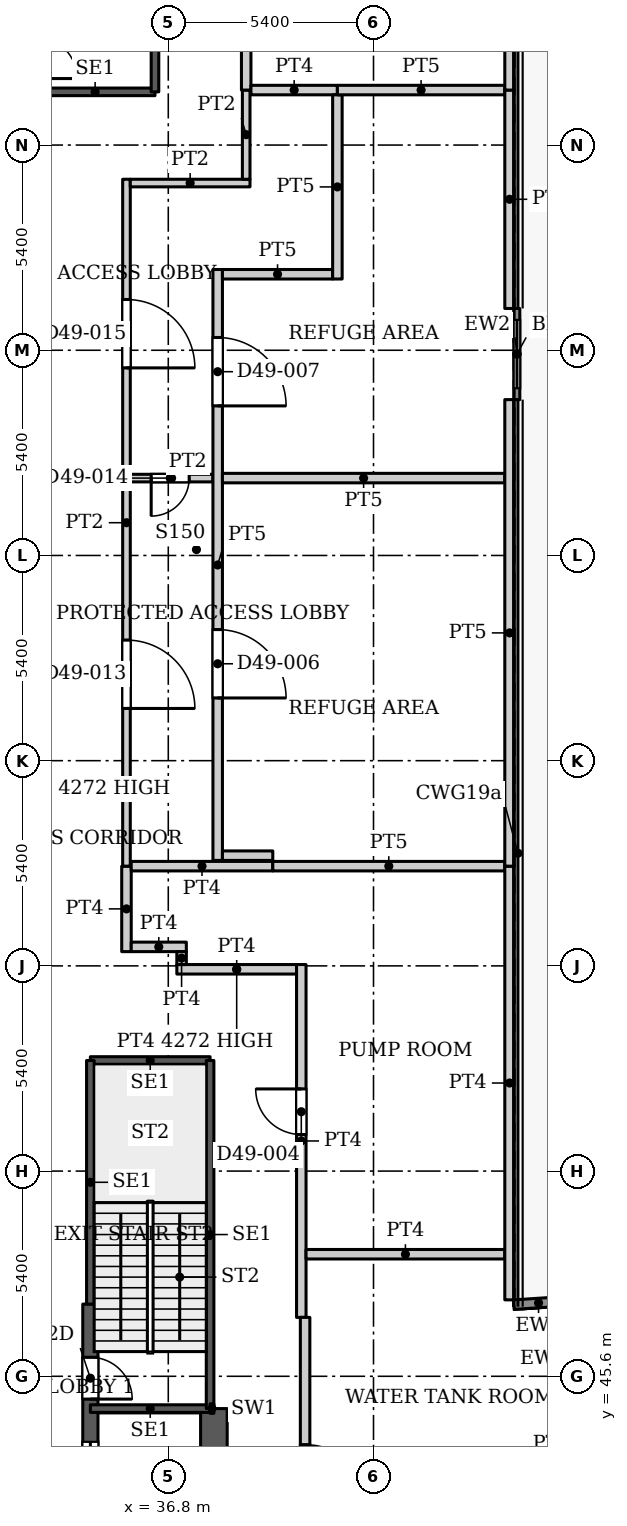
"""IFC4 building model, lengths in metres.
Left out: names, types, materials, properties, quantities, classifications, styles, units other than length and angle.
Written with IfcOpenShell. Run it as: python <this file> out.ifc"""

import sys

from ifc_helpers import new_model, si_unit, direction, frame, frame_2d, origin, place, context, subcontext, project, spatial, rectangle, extrude, source, transform, mapped, element, fill, save


model = new_model("IFC4")
c1 = context("Model", 3, precision=1e-05, world=origin(), true_north=direction((0.0, 1.0)))
c2 = subcontext(c1, "Body", "Model", "MODEL_VIEW")
j1 = project(units=[si_unit("LENGTHUNIT", "METRE"), si_unit("PLANEANGLEUNIT", "RADIAN")], contexts=[c1])
p1 = place(None, origin())
s1 = spatial("IfcSite", under=j1, at=p1, CompositionType="ELEMENT")
p2 = place(p1, origin())
s2 = spatial("IfcBuilding", under=s1, at=p2, CompositionType="ELEMENT")
p3 = place(p2, frame((0.0, 0.0, 211.1)))
s3 = spatial("IfcBuildingStorey", under=s2, at=p3, CompositionType="ELEMENT", Elevation=211.1)
p4 = place(p3, frame((34.75, 29.05, 0.0), z_axis=(0.0, 0.0, 1.0), x_axis=(0.0, 1.0, 0.0)))
e1 = element("IfcWall", 1, at=p4, inside=s3, PredefinedType="SHEAR", context=c2, shape_type="SweptSolid", body=[
    extrude(rectangle(XDim=18.45, YDim=0.4, at=frame_2d((9.225, 0.0))), origin(), (0.0, 0.0, 1.0), 5.1),
])
p5 = place(p4, frame((8.025, 0.0, 0.0)))
e2 = element("IfcOpeningElement", 2, at=p5, cuts=e1, PredefinedType="OPENING", context=c2, shape_type="SweptSolid", body=[
    extrude(rectangle(XDim=1.1, YDim=2.2, at=frame_2d((0.55, 1.1))), frame((0.0, 0.21, 0.0), z_axis=(0.0, -1.0, 0.0), x_axis=(1.0, 0.0, 0.0)), (0.0, 0.0, 1.0), 0.42),
])
p6 = place(p4, frame((10.875, 0.0, 0.0)))
e3 = element("IfcOpeningElement", 3, at=p6, cuts=e1, PredefinedType="OPENING", context=c2, shape_type="SweptSolid", body=[
    extrude(rectangle(XDim=1.1, YDim=2.2, at=frame_2d((0.55, 1.1))), frame((0.0, 0.21, 0.0), z_axis=(0.0, -1.0, 0.0), x_axis=(1.0, 0.0, 0.0)), (0.0, 0.0, 1.0), 0.42),
])
p7 = place(p4, frame((13.725, 0.0, 0.0)))
e4 = element("IfcOpeningElement", 4, at=p7, cuts=e1, PredefinedType="OPENING", context=c2, shape_type="SweptSolid", body=[
    extrude(rectangle(XDim=1.1, YDim=2.2, at=frame_2d((0.55, 1.1))), frame((0.0, 0.21, 0.0), z_axis=(0.0, -1.0, 0.0), x_axis=(1.0, 0.0, 0.0)), (0.0, 0.0, 1.0), 0.42),
])
p8 = place(p4, frame((15.95, 0.0, 0.0)))
e5 = element("IfcOpeningElement", 5, at=p8, cuts=e1, PredefinedType="OPENING", context=c2, shape_type="SweptSolid", body=[
    extrude(rectangle(XDim=1.1, YDim=2.2, at=frame_2d((0.55, 1.1))), frame((0.0, 0.21, 0.0), z_axis=(0.0, -1.0, 0.0), x_axis=(1.0, 0.0, 0.0)), (0.0, 0.0, 1.0), 0.42),
])
p9 = place(p3, frame((38.0, 36.2, 0.0), z_axis=(0.0, 0.0, 1.0), x_axis=(0.0, 1.0, 0.0)))
e6 = element("IfcWall", 6, at=p9, inside=s3, PredefinedType="SHEAR", context=c2, shape_type="SweptSolid", body=[
    extrude(rectangle(XDim=8.55, YDim=0.7, at=frame_2d((4.275, 0.0))), origin(), (0.0, 0.0, 1.0), 5.1),
])
p10 = place(p3, frame((45.975, 73.7, 0.0), z_axis=(0.0, 0.0, 1.0), x_axis=(0.0, -1.0, 0.0)))
e7 = element("IfcWall", 7, at=p10, inside=s3, PredefinedType="SOLIDWALL", context=c2, shape_type="SweptSolid", body=[
    extrude(rectangle(XDim=2.4, YDim=0.15, at=frame_2d((1.2, 0.0))), origin(), (0.0, 0.0, 1.0), 4.95),
])
p11 = place(p10, frame((0.3, 0.0, 0.0)))
e8 = element("IfcOpeningElement", 8, at=p11, cuts=e7, PredefinedType="OPENING", context=c2, shape_type="SweptSolid", body=[
    extrude(rectangle(XDim=1.8, YDim=2.4, at=frame_2d((0.9, 1.2))), frame((0.0, 0.085, 0.0), z_axis=(0.0, -1.0, 0.0), x_axis=(1.0, 0.0, 0.0)), (0.0, 0.0, 1.0), 0.17),
])
p12 = place(p3, frame((45.897, 47.486, 0.0), z_axis=(0.0, 0.0, 1.0), x_axis=(0.997841571158, 0.065667334864, 0.0)))
e9 = element("IfcWall", 9, at=p12, inside=s3, PredefinedType="SOLIDWALL", context=c2, shape_type="SweptSolid", body=[
    extrude(rectangle(XDim=1.294, YDim=0.25, at=frame_2d((0.647, 0.0))), origin(), (0.0, 0.0, 1.0), 4.95),
])
for number, where, z_axis, x_axis in (
    (10, (34.75, 44.75, 0.0), (0.0, 0.0, 1.0), (1.0, 0.0, 0.0)),
    (11, (34.75, 53.91, 0.0), (0.0, 0.0, 1.0), (1.0, 0.0, 0.0)),
):
    element("IfcWall", number, at=place(p3, frame(where, z_axis=z_axis, x_axis=x_axis)), inside=s3, PredefinedType="SHEAR", context=c2, shape_type="SweptSolid", body=[
        extrude(rectangle(XDim=3.15, YDim=0.2, at=frame_2d((1.575, 0.0))), origin(), (0.0, 0.0, 1.0), 5.1),
    ])
p13 = place(p3, frame((34.75, 47.5, 0.0), z_axis=(0.0, 0.0, 1.0), x_axis=(0.0, 1.0, 0.0)))
e12 = element("IfcWall", 12, at=p13, inside=s3, PredefinedType="SHEAR", context=c2, shape_type="SweptSolid", body=[
    extrude(rectangle(XDim=6.41, YDim=0.2, at=frame_2d((3.205, 0.0))), origin(), (0.0, 0.0, 1.0), 5.1),
])
p14 = place(p3, frame((37.9, 44.75, 0.0), z_axis=(0.0, 0.0, 1.0), x_axis=(0.0, 1.0, 0.0)))
e13 = element("IfcWall", 13, at=p14, inside=s3, PredefinedType="SHEAR", context=c2, shape_type="SweptSolid", body=[
    extrude(rectangle(XDim=9.16, YDim=0.2, at=frame_2d((4.58, 0.0))), origin(), (0.0, 0.0, 1.0), 5.1),
])
p15 = place(p3, frame((33.3, 79.4, 0.0), z_axis=(0.0, 0.0, 1.0), x_axis=(1.0, 0.0, 0.0)))
e14 = element("IfcWall", 14, at=p15, inside=s3, PredefinedType="SHEAR", context=c2, shape_type="SweptSolid", body=[
    extrude(rectangle(XDim=3.15, YDim=0.2, at=frame_2d((1.575, 0.0))), origin(), (0.0, 0.0, 1.0), 5.1),
])
p16 = place(p3, frame((36.45, 79.4, 0.0), z_axis=(0.0, 0.0, 1.0), x_axis=(0.0, 1.0, 0.0)))
e15 = element("IfcWall", 15, at=p16, inside=s3, PredefinedType="SHEAR", context=c2, shape_type="SweptSolid", body=[
    extrude(rectangle(XDim=9.16, YDim=0.2, at=frame_2d((4.58, 0.0))), origin(), (0.0, 0.0, 1.0), 5.1),
])
p17 = place(p3, frame((37.9, 44.75, 0.0), z_axis=(0.0, 0.0, 1.0), x_axis=(1.0, 0.0, 0.0)))
e16 = element("IfcWall", 16, at=p17, inside=s3, PredefinedType="PARTITIONING", context=c2, shape_type="SweptSolid", body=[
    extrude(rectangle(XDim=0.1, YDim=0.25, at=frame_2d((0.05, 0.0))), origin(), (0.0, 0.0, 1.0), 5.1),
])
p18 = place(p3, frame((35.7, 56.775, 0.0), z_axis=(0.0, 0.0, 1.0), x_axis=(0.0, 1.0, 0.0)))
e17 = element("IfcWall", 17, at=p18, inside=s3, PredefinedType="PARTITIONING", context=c2, shape_type="SweptSolid", body=[
    extrude(rectangle(XDim=2.249, YDim=0.25, at=frame_2d((1.125, 0.0))), origin(), (0.0, 0.0, 1.0), 4.8),
])
p19 = place(p3, frame((35.7, 59.024, 0.0), z_axis=(0.0, 0.0, 1.0), x_axis=(0.0, 1.0, 0.0)))
e18 = element("IfcWall", 18, at=p19, inside=s3, PredefinedType="PARTITIONING", context=c2, shape_type="SweptSolid", body=[
    extrude(rectangle(XDim=18.076, YDim=0.2, at=frame_2d((9.038, 0.0))), origin(), (0.0, 0.0, 1.0), 4.8),
])
p20 = place(p19, frame((4.15, 0.0, 0.0)))
e19 = element("IfcOpeningElement", 19, at=p20, cuts=e18, PredefinedType="OPENING", context=c2, shape_type="SweptSolid", body=[
    extrude(rectangle(XDim=1.8, YDim=2.1, at=frame_2d((0.9, 1.05))), frame((0.0, 0.11, 0.0), z_axis=(0.0, -1.0, 0.0), x_axis=(1.0, 0.0, 0.0)), (0.0, 0.0, 1.0), 0.22),
])
p21 = place(p19, frame((13.112, 0.0, 0.0)))
e20 = element("IfcOpeningElement", 20, at=p21, cuts=e18, PredefinedType="OPENING", context=c2, shape_type="SweptSolid", body=[
    extrude(rectangle(XDim=1.8, YDim=2.1, at=frame_2d((0.9, 1.05))), frame((0.0, 0.11, 0.0), z_axis=(0.0, -1.0, 0.0), x_axis=(1.0, 0.0, 0.0)), (0.0, 0.0, 1.0), 0.22),
])
p22 = place(p3, frame((35.8, 69.236, 0.0), z_axis=(0.0, 0.0, 1.0), x_axis=(1.0, 0.0, 0.0)))
e21 = element("IfcWall", 21, at=p22, inside=s3, PredefinedType="PARTITIONING", context=c2, shape_type="SweptSolid", body=[
    extrude(rectangle(XDim=2.175, YDim=0.2, at=frame_2d((1.087, 0.0))), origin(), (0.0, 0.0, 1.0), 4.8),
])
p23 = place(p22, frame((0.55, 0.0, 0.0)))
e22 = element("IfcOpeningElement", 22, at=p23, cuts=e21, PredefinedType="OPENING", context=c2, shape_type="SweptSolid", body=[
    extrude(rectangle(XDim=1.0, YDim=2.1, at=frame_2d((0.5, 1.05))), frame((0.0, 0.11, 0.0), z_axis=(0.0, -1.0, 0.0), x_axis=(1.0, 0.0, 0.0)), (0.0, 0.0, 1.0), 0.22),
])
p24 = place(p3, frame((35.8, 77.0, 0.0), z_axis=(0.0, 0.0, 1.0), x_axis=(1.0, 0.0, 0.0)))
e23 = element("IfcWall", 23, at=p24, inside=s3, PredefinedType="PARTITIONING", context=c2, shape_type="SweptSolid", body=[
    extrude(rectangle(XDim=3.15, YDim=0.2, at=frame_2d((1.575, 0.0))), origin(), (0.0, 0.0, 1.0), 4.8),
])
p25 = place(p3, frame((35.825, 56.9, 0.0), z_axis=(0.0, 0.0, 1.0), x_axis=(1.0, 0.0, 0.0)))
e24 = element("IfcWall", 24, at=p25, inside=s3, PredefinedType="PARTITIONING", context=c2, shape_type="SweptSolid", body=[
    extrude(rectangle(XDim=1.45, YDim=0.25, at=frame_2d((0.725, 0.0))), origin(), (0.0, 0.0, 1.0), 4.8),
])
p26 = place(p3, frame((35.825, 59.024, 0.0), z_axis=(0.0, 0.0, 1.0), x_axis=(1.0, 0.0, 0.0)))
e25 = element("IfcWall", 25, at=p26, inside=s3, PredefinedType="PARTITIONING", context=c2, shape_type="SweptSolid", body=[
    extrude(rectangle(XDim=3.725, YDim=0.25, at=frame_2d((1.863, 0.0))), origin(), (0.0, 0.0, 1.0), 4.8),
])
p27 = place(p3, frame((37.025, 56.31, 0.0), z_axis=(0.0, 0.0, 1.0), x_axis=(1.0, 0.0, 0.0)))
e26 = element("IfcWall", 26, at=p27, inside=s3, PredefinedType="PARTITIONING", context=c2, shape_type="SweptSolid", body=[
    extrude(rectangle(XDim=3.15, YDim=0.25, at=frame_2d((1.575, 0.0))), origin(), (0.0, 0.0, 1.0), 4.272),
])
p28 = place(p3, frame((37.15, 56.435, 0.0), z_axis=(0.0, 0.0, 1.0), x_axis=(0.0, 1.0, 0.0)))
e27 = element("IfcWall", 27, at=p28, inside=s3, PredefinedType="PARTITIONING", context=c2, shape_type="SweptSolid", body=[
    extrude(rectangle(XDim=0.34, YDim=0.25, at=frame_2d((0.17, 0.0))), origin(), (0.0, 0.0, 1.0), 4.8),
])
p29 = place(p3, frame((38.1, 59.175, 0.0), z_axis=(0.0, 0.0, 1.0), x_axis=(0.0, 1.0, 0.0)))
e28 = element("IfcWall", 28, at=p29, inside=s3, PredefinedType="PARTITIONING", context=c2, shape_type="SweptSolid", body=[
    extrude(rectangle(XDim=15.55, YDim=0.25, at=frame_2d((7.775, 0.0))), origin(), (0.0, 0.0, 1.0), 4.8),
])
p30 = place(p29, frame((4.275, 0.0, 0.0)))
e29 = element("IfcOpeningElement", 29, at=p30, cuts=e28, PredefinedType="OPENING", context=c2, shape_type="SweptSolid", body=[
    extrude(rectangle(XDim=1.8, YDim=2.1, at=frame_2d((0.9, 1.05))), frame((0.0, 0.135, 0.0), z_axis=(0.0, -1.0, 0.0), x_axis=(1.0, 0.0, 0.0)), (0.0, 0.0, 1.0), 0.27),
])
p31 = place(p29, frame((11.961, 0.0, 0.0)))
e30 = element("IfcOpeningElement", 30, at=p31, cuts=e28, PredefinedType="OPENING", context=c2, shape_type="SweptSolid", body=[
    extrude(rectangle(XDim=1.8, YDim=2.1, at=frame_2d((0.9, 1.05))), frame((0.0, 0.135, 0.0), z_axis=(0.0, -1.0, 0.0), x_axis=(1.0, 0.0, 0.0)), (0.0, 0.0, 1.0), 0.27),
])
p32 = place(p3, frame((38.225, 59.3, 0.0), z_axis=(0.0, 0.0, 1.0), x_axis=(1.0, 0.0, 0.0)))
e31 = element("IfcWall", 31, at=p32, inside=s3, PredefinedType="PARTITIONING", context=c2, shape_type="SweptSolid", body=[
    extrude(rectangle(XDim=1.325, YDim=0.25, at=frame_2d((0.663, 0.0))), origin(), (0.0, 0.0, 1.0), 4.8),
])
p33 = place(p3, frame((38.225, 69.236, 0.0), z_axis=(0.0, 0.0, 1.0), x_axis=(1.0, 0.0, 0.0)))
e32 = element("IfcWall", 32, at=p33, inside=s3, PredefinedType="PARTITIONING", context=c2, shape_type="SweptSolid", body=[
    extrude(rectangle(XDim=7.43, YDim=0.25, at=frame_2d((3.715, 0.0))), origin(), (0.0, 0.0, 1.0), 4.8),
])
p34 = place(p3, frame((38.225, 74.6, 0.0), z_axis=(0.0, 0.0, 1.0), x_axis=(1.0, 0.0, 0.0)))
e33 = element("IfcWall", 33, at=p34, inside=s3, PredefinedType="PARTITIONING", context=c2, shape_type="SweptSolid", body=[
    extrude(rectangle(XDim=2.9, YDim=0.25, at=frame_2d((1.45, 0.0))), origin(), (0.0, 0.0, 1.0), 4.8),
])
p35 = place(p3, frame((38.85, 77.1, 0.0), z_axis=(0.0, 0.0, 1.0), x_axis=(0.0, 1.0, 0.0)))
e34 = element("IfcWall", 34, at=p35, inside=s3, PredefinedType="PARTITIONING", context=c2, shape_type="SweptSolid", body=[
    extrude(rectangle(XDim=2.347, YDim=0.2, at=frame_2d((1.173, 0.0))), origin(), (0.0, 0.0, 1.0), 4.8),
])
p36 = place(p3, frame((38.85, 79.447, 0.0), z_axis=(0.0, 0.0, 1.0), x_axis=(0.0, 1.0, 0.0)))
e35 = element("IfcWall", 35, at=p36, inside=s3, PredefinedType="PARTITIONING", context=c2, shape_type="SweptSolid", body=[
    extrude(rectangle(XDim=10.212, YDim=0.25, at=frame_2d((5.106, 0.0))), origin(), (0.0, 0.0, 1.0), 4.8),
])
p37 = place(p36, frame((4.4, 0.0, 0.0)))
e36 = element("IfcOpeningElement", 36, at=p37, cuts=e35, PredefinedType="OPENING", context=c2, shape_type="SweptSolid", body=[
    extrude(rectangle(XDim=1.2, YDim=2.1, at=frame_2d((0.6, 1.05))), frame((0.0, 0.135, 0.0), z_axis=(0.0, -1.0, 0.0), x_axis=(1.0, 0.0, 0.0)), (0.0, 0.0, 1.0), 0.27),
])
p38 = place(p3, frame((38.975, 79.447, 0.0), z_axis=(0.0, 0.0, 1.0), x_axis=(1.0, 0.0, 0.0)))
e37 = element("IfcWall", 37, at=p38, inside=s3, PredefinedType="PARTITIONING", context=c2, shape_type="SweptSolid", body=[
    extrude(rectangle(XDim=2.275, YDim=0.25, at=frame_2d((1.137, 0.0))), origin(), (0.0, 0.0, 1.0), 4.8),
])
p39 = place(p3, frame((39.55, 59.024, 0.0), z_axis=(0.0, 0.0, 1.0), x_axis=(1.0, 0.0, 0.0)))
e38 = element("IfcWall", 38, at=p39, inside=s3, PredefinedType="PARTITIONING", context=c2, shape_type="SweptSolid", body=[
    extrude(rectangle(XDim=6.105, YDim=0.25, at=frame_2d((3.052, 0.0))), origin(), (0.0, 0.0, 1.0), 4.8),
])
p40 = place(p3, frame((40.3, 47.15, 0.0), z_axis=(0.0, 0.0, 1.0), x_axis=(0.0, 1.0, 0.0)))
e39 = element("IfcWall", 39, at=p40, inside=s3, PredefinedType="PARTITIONING", context=c2, shape_type="SweptSolid", body=[
    extrude(rectangle(XDim=9.285, YDim=0.25, at=frame_2d((4.643, 0.0))), origin(), (0.0, 0.0, 1.0), 4.8),
])
p41 = place(p40, frame((4.812, 0.0, 0.0)))
e40 = element("IfcOpeningElement", 40, at=p41, cuts=e39, PredefinedType="OPENING", context=c2, shape_type="SweptSolid", body=[
    extrude(rectangle(XDim=1.2, YDim=2.1, at=frame_2d((0.6, 1.05))), frame((0.0, 0.135, 0.0), z_axis=(0.0, -1.0, 0.0), x_axis=(1.0, 0.0, 0.0)), (0.0, 0.0, 1.0), 0.27),
])
p42 = place(p3, frame((40.4, 41.623, 0.0), z_axis=(0.0, 0.0, 1.0), x_axis=(0.0, 1.0, 0.0)))
e41 = element("IfcWall", 41, at=p42, inside=s3, PredefinedType="PARTITIONING", context=c2, shape_type="SweptSolid", body=[
    extrude(rectangle(XDim=5.527, YDim=0.25, at=frame_2d((2.763, 0.0))), origin(), (0.0, 0.0, 1.0), 4.8),
])
p43 = place(p42, frame((0.377, 0.0, 0.0)))
e42 = element("IfcOpeningElement", 42, at=p43, cuts=e41, PredefinedType="OPENING", context=c2, shape_type="SweptSolid", body=[
    extrude(rectangle(XDim=1.8, YDim=2.1, at=frame_2d((0.9, 1.05))), frame((0.0, 0.135, 0.0), z_axis=(0.0, -1.0, 0.0), x_axis=(1.0, 0.0, 0.0)), (0.0, 0.0, 1.0), 0.27),
])
p44 = place(p3, frame((40.425, 48.812, 0.0), z_axis=(0.0, 0.0, 1.0), x_axis=(1.0, 0.0, 0.0)))
e43 = element("IfcWall", 43, at=p44, inside=s3, PredefinedType="PARTITIONING", context=c2, shape_type="SweptSolid", body=[
    extrude(rectangle(XDim=5.23, YDim=0.25, at=frame_2d((2.615, 0.0))), origin(), (0.0, 0.0, 1.0), 4.8),
])
p45 = place(p3, frame((41.25, 74.475, 0.0), z_axis=(0.0, 0.0, 1.0), x_axis=(0.0, 1.0, 0.0)))
e44 = element("IfcWall", 44, at=p45, inside=s3, PredefinedType="PARTITIONING", context=c2, shape_type="SweptSolid", body=[
    extrude(rectangle(XDim=4.847, YDim=0.25, at=frame_2d((2.423, 0.0))), origin(), (0.0, 0.0, 1.0), 4.8),
])
p46 = place(p3, frame((41.25, 79.447, 0.0), z_axis=(0.0, 0.0, 1.0), x_axis=(1.0, 0.0, 0.0)))
e45 = element("IfcWall", 45, at=p46, inside=s3, PredefinedType="PARTITIONING", context=c2, shape_type="SweptSolid", body=[
    extrude(rectangle(XDim=4.405, YDim=0.25, at=frame_2d((2.203, 0.0))), origin(), (0.0, 0.0, 1.0), 4.8),
])
p47 = place(p3, frame((45.78, 47.611, 0.0), z_axis=(0.0, 0.0, 1.0), x_axis=(0.0, 1.0, 0.0)))
e46 = element("IfcWall", 46, at=p47, inside=s3, PredefinedType="PARTITIONING", context=c2, shape_type="SweptSolid", body=[
    extrude(rectangle(XDim=11.413, YDim=0.25, at=frame_2d((5.707, 0.0))), origin(), (0.0, 0.0, 1.0), 4.8),
])
p48 = place(p3, frame((45.78, 59.024, 0.0), z_axis=(0.0, 0.0, 1.0), x_axis=(0.0, 1.0, 0.0)))
e47 = element("IfcWall", 47, at=p48, inside=s3, PredefinedType="PARTITIONING", context=c2, shape_type="SweptSolid", body=[
    extrude(rectangle(XDim=12.277, YDim=0.25, at=frame_2d((6.139, 0.0))), origin(), (0.0, 0.0, 1.0), 4.8),
])
p49 = place(p3, frame((45.78, 73.699, 0.0), z_axis=(0.0, 0.0, 1.0), x_axis=(0.0, 1.0, 0.0)))
e48 = element("IfcWall", 48, at=p49, inside=s3, PredefinedType="PARTITIONING", context=c2, shape_type="SweptSolid", body=[
    extrude(rectangle(XDim=5.748, YDim=0.25, at=frame_2d((2.874, 0.0))), origin(), (0.0, 0.0, 1.0), 4.8),
])
p50 = place(p3, frame((45.78, 79.447, 0.0), z_axis=(0.0, 0.0, 1.0), x_axis=(0.0, 1.0, 0.0)))
e49 = element("IfcWall", 49, at=p50, inside=s3, PredefinedType="PARTITIONING", context=c2, shape_type="SweptSolid", body=[
    extrude(rectangle(XDim=10.212, YDim=0.25, at=frame_2d((5.106, 0.0))), origin(), (0.0, 0.0, 1.0), 4.8),
])
m1 = source(origin(), c2, "Body", "SweptSolid", [
    extrude(rectangle(XDim=1.8, YDim=2.4, at=frame_2d((0.9, 1.2))), frame((0.0, 0.025, 0.0), z_axis=(0.0, -1.0, 0.0), x_axis=(1.0, 0.0, 0.0)), (0.0, 0.0, 1.0), 0.05),
])
p51 = place(p11, origin())
e50 = element("IfcDoor", 50, at=p51, inside=s3, OperationType="SLIDING_TO_LEFT", PredefinedType="DOOR", context=c2, shape_type="MappedRepresentation", body=[
    mapped(m1, transform((0.0, 0.0, 0.0), x_axis=(1.0, 0.0, 0.0), y_axis=(0.0, 1.0, 0.0), z_axis=(0.0, 0.0, 1.0), scale=1.0)),
])
fill(e8, e50)
m2 = source(origin(), c2, "Body", "SweptSolid", [
    extrude(rectangle(XDim=1.1, YDim=2.2, at=frame_2d((0.55, 1.1))), frame((0.0, 0.025, 0.0), z_axis=(0.0, -1.0, 0.0), x_axis=(1.0, 0.0, 0.0)), (0.0, 0.0, 1.0), 0.05),
])
p52 = place(p7, origin())
e51 = element("IfcDoor", 51, at=p52, inside=s3, OperationType="SLIDING_TO_LEFT", PredefinedType="DOOR", context=c2, shape_type="MappedRepresentation", body=[
    mapped(m2, transform((0.0, 0.0, 0.0), x_axis=(1.0, 0.0, 0.0), y_axis=(0.0, 1.0, 0.0), z_axis=(0.0, 0.0, 1.0), scale=1.0)),
])
fill(e4, e51)
m3 = source(origin(), c2, "Body", "SweptSolid", [
    extrude(rectangle(XDim=1.1, YDim=2.2, at=frame_2d((0.55, 1.1))), frame((0.0, 0.025, 0.0), z_axis=(0.0, -1.0, 0.0), x_axis=(1.0, 0.0, 0.0)), (0.0, 0.0, 1.0), 0.05),
])
p53 = place(p8, origin())
e52 = element("IfcDoor", 52, at=p53, inside=s3, OperationType="SINGLE_SWING_RIGHT", PredefinedType="DOOR", context=c2, shape_type="MappedRepresentation", body=[
    mapped(m3, transform((0.0, 0.0, 0.0), x_axis=(1.0, 0.0, 0.0), y_axis=(0.0, 1.0, 0.0), z_axis=(0.0, 0.0, 1.0), scale=1.0)),
])
fill(e5, e52)
m4 = source(origin(), c2, "Body", "SweptSolid", [
    extrude(rectangle(XDim=1.2, YDim=2.1, at=frame_2d((0.6, 1.05))), frame((0.0, 0.025, 0.0), z_axis=(0.0, -1.0, 0.0), x_axis=(1.0, 0.0, 0.0)), (0.0, 0.0, 1.0), 0.05),
])
p54 = place(p41, origin())
e53 = element("IfcDoor", 53, at=p54, inside=s3, OperationType="SINGLE_SWING_LEFT", PredefinedType="DOOR", context=c2, shape_type="MappedRepresentation", body=[
    mapped(m4, transform((0.0, 0.0, 0.0), x_axis=(1.0, 0.0, 0.0), y_axis=(0.0, 1.0, 0.0), z_axis=(0.0, 0.0, 1.0), scale=1.0)),
])
fill(e40, e53)
m5 = source(origin(), c2, "Body", "SweptSolid", [
    extrude(rectangle(XDim=1.8, YDim=2.1, at=frame_2d((0.9, 1.05))), frame((0.0, 0.025, 0.0), z_axis=(0.0, -1.0, 0.0), x_axis=(1.0, 0.0, 0.0)), (0.0, 0.0, 1.0), 0.05),
])
p55 = place(p43, origin())
e54 = element("IfcDoor", 54, at=p55, inside=s3, OperationType="DOUBLE_DOOR_SINGLE_SWING", PredefinedType="DOOR", context=c2, shape_type="MappedRepresentation", body=[
    mapped(m5, transform((0.0, 0.0, 0.0), x_axis=(1.0, 0.0, 0.0), y_axis=(0.0, 1.0, 0.0), z_axis=(0.0, 0.0, 1.0), scale=1.0)),
])
fill(e42, e54)
p56 = place(p30, origin())
e55 = element("IfcDoor", 55, at=p56, inside=s3, OperationType="DOUBLE_DOOR_SINGLE_SWING", PredefinedType="DOOR", context=c2, shape_type="MappedRepresentation", body=[
    mapped(m5, transform((0.0, 0.0, 0.0), x_axis=(1.0, 0.0, 0.0), y_axis=(0.0, 1.0, 0.0), z_axis=(0.0, 0.0, 1.0), scale=1.0)),
])
fill(e29, e55)
p57 = place(p31, origin())
e56 = element("IfcDoor", 56, at=p57, inside=s3, OperationType="DOUBLE_DOOR_SINGLE_SWING", PredefinedType="DOOR", context=c2, shape_type="MappedRepresentation", body=[
    mapped(m5, transform((0.0, 0.0, 0.0), x_axis=(1.0, 0.0, 0.0), y_axis=(0.0, 1.0, 0.0), z_axis=(0.0, 0.0, 1.0), scale=1.0)),
])
fill(e30, e56)
m6 = source(origin(), c2, "Body", "SweptSolid", [
    extrude(rectangle(XDim=1.8, YDim=2.1, at=frame_2d((0.9, 1.05))), frame((0.0, 0.025, 0.0), z_axis=(0.0, -1.0, 0.0), x_axis=(1.0, 0.0, 0.0)), (0.0, 0.0, 1.0), 0.05),
])
p58 = place(p20, origin())
e57 = element("IfcDoor", 57, at=p58, inside=s3, OperationType="DOUBLE_DOOR_SINGLE_SWING", PredefinedType="DOOR", context=c2, shape_type="MappedRepresentation", body=[
    mapped(m6, transform((0.0, 0.0, 0.0), x_axis=(1.0, 0.0, 0.0), y_axis=(0.0, 1.0, 0.0), z_axis=(0.0, 0.0, 1.0), scale=1.0)),
])
fill(e19, e57)
m7 = source(origin(), c2, "Body", "SweptSolid", [
    extrude(rectangle(XDim=1.0, YDim=2.1, at=frame_2d((0.5, 1.05))), frame((0.0, 0.025, 0.0), z_axis=(0.0, -1.0, 0.0), x_axis=(1.0, 0.0, 0.0)), (0.0, 0.0, 1.0), 0.05),
])
p59 = place(p23, origin())
e58 = element("IfcDoor", 58, at=p59, inside=s3, OperationType="SINGLE_SWING_RIGHT", PredefinedType="DOOR", context=c2, shape_type="MappedRepresentation", body=[
    mapped(m7, transform((0.0, 0.0, 0.0), x_axis=(1.0, 0.0, 0.0), y_axis=(0.0, 1.0, 0.0), z_axis=(0.0, 0.0, 1.0), scale=1.0)),
])
fill(e22, e58)
p60 = place(p21, origin())
e59 = element("IfcDoor", 59, at=p60, inside=s3, OperationType="DOUBLE_DOOR_SINGLE_SWING", PredefinedType="DOOR", context=c2, shape_type="MappedRepresentation", body=[
    mapped(m6, transform((0.0, 0.0, 0.0), x_axis=(1.0, 0.0, 0.0), y_axis=(0.0, 1.0, 0.0), z_axis=(0.0, 0.0, 1.0), scale=1.0)),
])
fill(e20, e59)
save(model, sys.argv[1])
